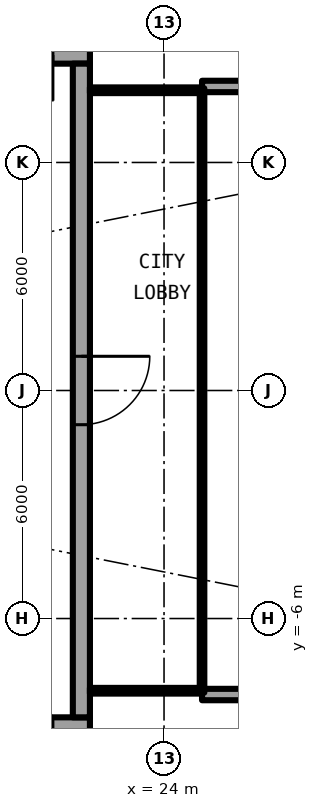
"""IFC4 building model, lengths in metres.
Left out: names, types, materials, properties, quantities, classifications, styles, units other than length and angle.
Written with IfcOpenShell. Run it as: python <this file> out.ifc"""

import sys

from ifc_helpers import new_model, si_unit, direction, frame, frame_2d, origin, place, context, subcontext, project, spatial, rectangle, extrude, element, fill, save


model = new_model("IFC4")
c1 = context("Model", 3, precision=1e-05, world=origin(), true_north=direction((0.0, 1.0)))
c2 = subcontext(c1, "Body", "Model", "MODEL_VIEW")
j1 = project(units=[si_unit("LENGTHUNIT", "METRE"), si_unit("PLANEANGLEUNIT", "RADIAN")], contexts=[c1])
p1 = place(None, origin())
s1 = spatial("IfcSite", under=j1, at=p1, CompositionType="ELEMENT")
p2 = place(p1, origin())
s2 = spatial("IfcBuilding", under=s1, at=p2, CompositionType="ELEMENT")
p3 = place(p2, frame((0.0, 0.0, 199.35)))
s3 = spatial("IfcBuildingStorey", under=s2, at=p3, CompositionType="ELEMENT", Elevation=199.35)
for number, where, z_axis, x_axis in (
    (1, (25.0, 8.0, 0.0), (0.0, 0.0, 1.0), (1.0, 0.0, 0.0)),
    (2, (25.0, -8.0, 0.0), (0.0, 0.0, 1.0), (1.0, 0.0, 0.0)),
):
    element("IfcWall", number, at=place(p3, frame(where, z_axis=z_axis, x_axis=x_axis)), inside=s3, PredefinedType="SOLIDWALL", context=c2, shape_type="SweptSolid", body=[
        extrude(rectangle(XDim=2.667, YDim=0.3, at=frame_2d((1.333, 0.0))), origin(), (0.0, 0.0, 1.0), 2.7),
    ])
p4 = place(p3, frame((22.05, 8.825, 0.0), z_axis=(0.0, 0.0, 1.0), x_axis=(-1.0, 0.0, 0.0)))
e3 = element("IfcWall", 3, at=p4, inside=s3, PredefinedType="SHEAR", context=c2, shape_type="SweptSolid", body=[
    extrude(rectangle(XDim=13.5, YDim=0.45, at=frame_2d((6.75, 0.0))), origin(), (0.0, 0.0, 1.0), 3.05),
])
p5 = place(p4, frame((0.975, 0.0, 0.0)))
e4 = element("IfcOpeningElement", 4, at=p5, cuts=e3, PredefinedType="OPENING", context=c2, shape_type="SweptSolid", body=[
    extrude(rectangle(XDim=1.2, YDim=2.3, at=frame_2d((0.6, 1.15))), frame((0.0, 0.235, 0.0), z_axis=(0.0, -1.0, 0.0), x_axis=(1.0, 0.0, 0.0)), (0.0, 0.0, 1.0), 0.47),
])
p6 = place(p3, frame((8.55, -8.825, 0.0), z_axis=(0.0, 0.0, 1.0), x_axis=(1.0, 0.0, 0.0)))
e5 = element("IfcWall", 5, at=p6, inside=s3, PredefinedType="SHEAR", context=c2, shape_type="SweptSolid", body=[
    extrude(rectangle(XDim=13.5, YDim=0.45, at=frame_2d((6.75, 0.0))), origin(), (0.0, 0.0, 1.0), 3.05),
])
p7 = place(p6, frame((11.325, 0.0, 0.0)))
e6 = element("IfcOpeningElement", 6, at=p7, cuts=e5, PredefinedType="OPENING", context=c2, shape_type="SweptSolid", body=[
    extrude(rectangle(XDim=1.2, YDim=2.3, at=frame_2d((0.6, 1.15))), frame((0.0, 0.235, 0.0), z_axis=(0.0, -1.0, 0.0), x_axis=(1.0, 0.0, 0.0)), (0.0, 0.0, 1.0), 0.47),
])
p8 = place(p3, frame((21.825, 8.6, 0.0), z_axis=(0.0, 0.0, 1.0), x_axis=(0.0, -1.0, 0.0)))
e7 = element("IfcWall", 7, at=p8, inside=s3, PredefinedType="SHEAR", context=c2, shape_type="SweptSolid", body=[
    extrude(rectangle(XDim=17.2, YDim=0.45, at=frame_2d((8.6, 0.0))), origin(), (0.0, 0.0, 1.0), 3.05),
])
p9 = place(p8, frame((7.7, 0.0, 0.0)))
e8 = element("IfcOpeningElement", 8, at=p9, cuts=e7, PredefinedType="OPENING", context=c2, shape_type="SweptSolid", body=[
    extrude(rectangle(XDim=1.8, YDim=2.3, at=frame_2d((0.9, 1.15))), frame((0.0, 0.235, 0.0), z_axis=(0.0, -1.0, 0.0), x_axis=(1.0, 0.0, 0.0)), (0.0, 0.0, 1.0), 0.47),
])
for number, where, z_axis, x_axis in (
    (9, (22.05, -7.9, 0.0), (0.0, 0.0, 1.0), (1.0, 0.0, 0.0)),
    (10, (22.05, 7.9, 0.0), (0.0, 0.0, 1.0), (1.0, 0.0, 0.0)),
):
    element("IfcWall", number, at=place(p3, frame(where, z_axis=z_axis, x_axis=x_axis)), inside=s3, PredefinedType="PARTITIONING", context=c2, shape_type="SweptSolid", body=[
        extrude(rectangle(XDim=2.89, YDim=0.15, at=frame_2d((1.445, 0.0))), origin(), (0.0, 0.0, 1.0), 2.7),
    ])
p10 = place(p3, frame((25.0, -7.95, 0.0), z_axis=(0.0, 0.0, 1.0), x_axis=(0.0, 1.0, 0.0)))
e11 = element("IfcWall", 11, at=p10, inside=s3, PredefinedType="PARTITIONING", context=c2, shape_type="SweptSolid", body=[
    extrude(rectangle(XDim=15.9, YDim=0.12, at=frame_2d((7.95, 0.0))), origin(), (0.0, 0.0, 1.0), 2.7),
])
p11 = place(p10, frame((0.95, 0.0, 0.1)))
e12 = element("IfcOpeningElement", 12, at=p11, cuts=e11, PredefinedType="OPENING", context=c2, shape_type="SweptSolid", body=[
    extrude(rectangle(XDim=14.0, YDim=2.35, at=frame_2d((7.0, 1.175))), frame((0.0, 0.07, 0.0), z_axis=(0.0, -1.0, 0.0), x_axis=(1.0, 0.0, 0.0)), (0.0, 0.0, 1.0), 0.14),
])
p12 = place(p5, origin())
e13 = element("IfcDoor", 13, at=p12, inside=s3, OperationType="SINGLE_SWING_RIGHT", PredefinedType="DOOR", context=c2, shape_type="SweptSolid", body=[
    extrude(rectangle(XDim=1.2, YDim=2.3, at=frame_2d((0.6, 1.15))), frame((0.0, 0.025, 0.0), z_axis=(0.0, -1.0, 0.0), x_axis=(1.0, 0.0, 0.0)), (0.0, 0.0, 1.0), 0.05),
])
fill(e4, e13)
p13 = place(p7, origin())
e14 = element("IfcDoor", 14, at=p13, inside=s3, OperationType="SINGLE_SWING_LEFT", PredefinedType="DOOR", context=c2, shape_type="SweptSolid", body=[
    extrude(rectangle(XDim=1.2, YDim=2.3, at=frame_2d((0.6, 1.15))), frame((0.0, 0.025, 0.0), z_axis=(0.0, -1.0, 0.0), x_axis=(1.0, 0.0, 0.0)), (0.0, 0.0, 1.0), 0.05),
])
fill(e6, e14)
p14 = place(p9, origin())
e15 = element("IfcDoor", 15, at=p14, inside=s3, OperationType="SINGLE_SWING_LEFT", PredefinedType="DOOR", context=c2, shape_type="SweptSolid", body=[
    extrude(rectangle(XDim=1.8, YDim=2.3, at=frame_2d((0.9, 1.15))), frame((0.0, 0.025, 0.0), z_axis=(0.0, -1.0, 0.0), x_axis=(1.0, 0.0, 0.0)), (0.0, 0.0, 1.0), 0.05),
])
fill(e8, e15)
p15 = place(p11, origin())
e16 = element("IfcWindow", 16, at=p15, inside=s3, PartitioningType="SINGLE_PANEL", PredefinedType="WINDOW", context=c2, shape_type="SweptSolid", body=[
    extrude(rectangle(XDim=14.0, YDim=2.35, at=frame_2d((7.0, 1.175))), frame((0.0, 0.03, 0.0), z_axis=(0.0, -1.0, 0.0), x_axis=(1.0, 0.0, 0.0)), (0.0, 0.0, 1.0), 0.06),
])
fill(e12, e16)
save(model, sys.argv[1])
